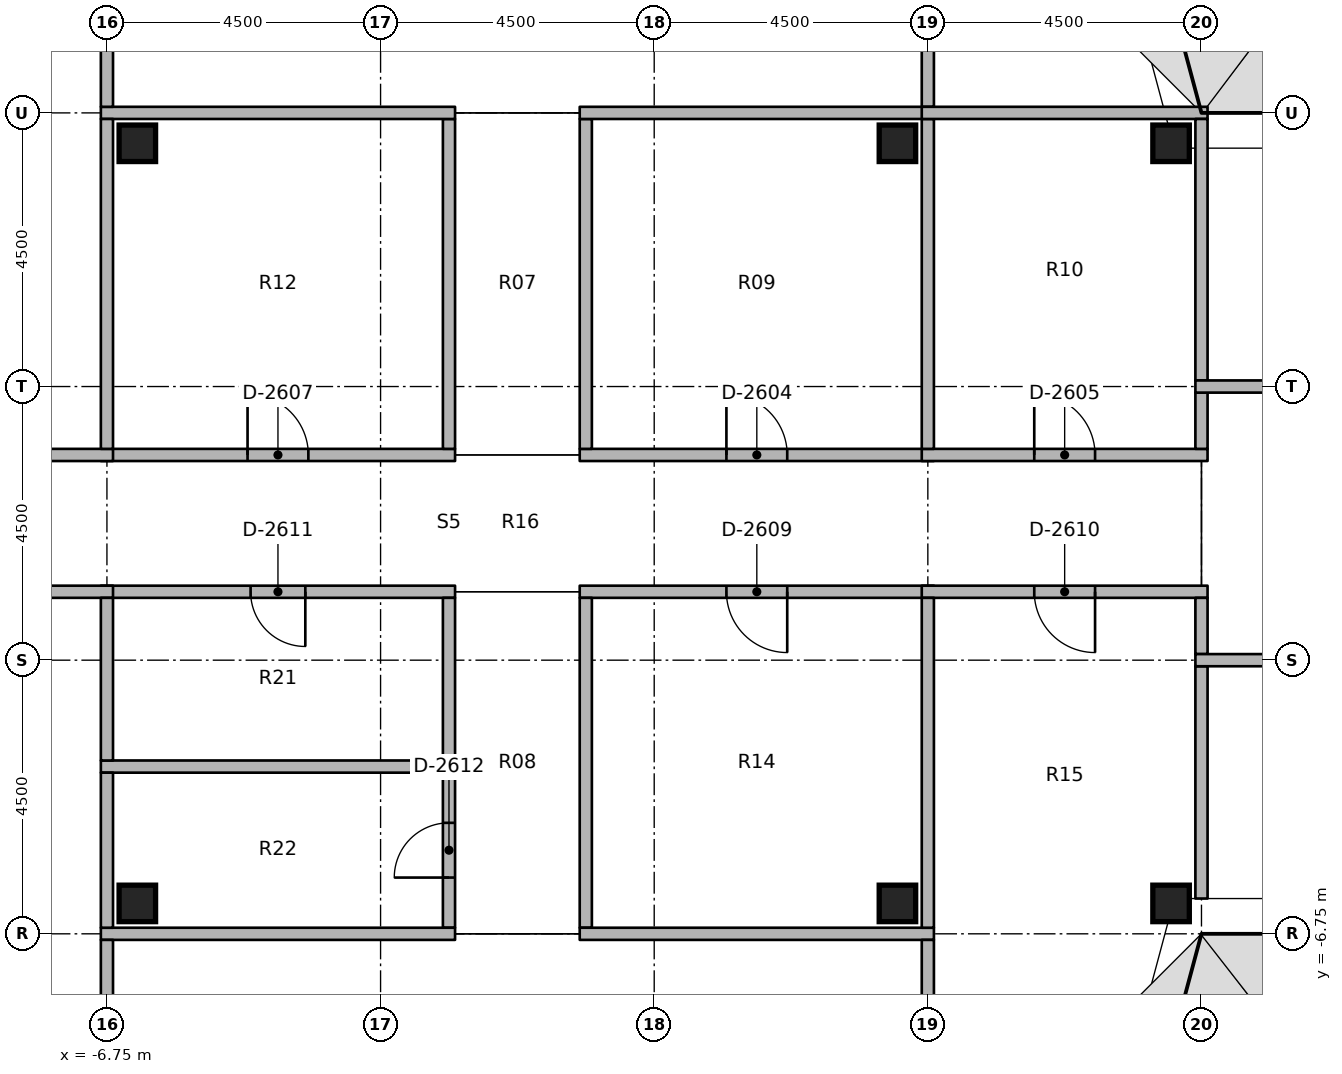
"""IFC4 building model, lengths in metres.
Left out: names, types, materials, properties, quantities, classifications, styles, units other than length and angle.
Written with IfcOpenShell. Run it as: python <this file> out.ifc"""

import sys

from ifc_helpers import new_model, si_unit, direction, frame, frame_2d, origin, origin_2d, place, context, subcontext, project, spatial, rectangle, extrude, element, fill, save


model = new_model("IFC4")
c1 = context("Model", 3, precision=1e-05, world=origin(), true_north=direction((0.0, 1.0)))
c2 = subcontext(c1, "Body", "Model", "MODEL_VIEW")
j1 = project(units=[si_unit("LENGTHUNIT", "METRE"), si_unit("PLANEANGLEUNIT", "RADIAN")], contexts=[c1])
p1 = place(None, origin())
s1 = spatial("IfcSite", under=j1, at=p1, CompositionType="ELEMENT")
p2 = place(p1, origin())
s2 = spatial("IfcBuilding", under=s1, at=p2, CompositionType="ELEMENT")
p3 = place(p2, frame((0.0, 0.0, 249.8)))
s3 = spatial("IfcBuildingStorey", under=s2, at=p3, CompositionType="ELEMENT", Elevation=249.8)
for number, where, z_axis, x_axis in (
    (1, (-6.25, -6.25, 0.0), (0.0, 0.0, 1.0), (1.0, 0.0, 0.0)),
    (2, (-6.25, 6.25, 0.0), (0.0, 0.0, 1.0), (1.0, 0.0, 0.0)),
    (3, (6.25, -6.25, 0.0), (0.0, 0.0, 1.0), (1.0, 0.0, 0.0)),
    (4, (6.25, 6.25, 0.0), (0.0, 0.0, 1.0), (1.0, 0.0, 0.0)),
    (5, (10.75, -6.25, 0.0), (0.0, 0.0, 1.0), (1.0, 0.0, 0.0)),
    (6, (10.75, 6.25, 0.0), (0.0, 0.0, 1.0), (1.0, 0.0, 0.0)),
):
    element("IfcColumn", number, at=place(p3, frame(where, z_axis=z_axis, x_axis=x_axis)), inside=s3, PredefinedType="COLUMN", context=c2, shape_type="SweptSolid", body=[
        extrude(rectangle(XDim=0.6, YDim=0.6, at=origin_2d()), origin(), (0.0, 0.0, 1.0), 3.65),
    ])
p4 = place(p3, frame((1.025, 1.125, 0.0), z_axis=(0.0, 0.0, 1.0), x_axis=(1.0, 0.0, 0.0)))
e7 = element("IfcWall", 7, at=p4, inside=s3, PredefinedType="PARTITIONING", context=c2, shape_type="SweptSolid", body=[
    extrude(rectangle(XDim=5.825, YDim=0.2, at=frame_2d((2.913, 0.0))), origin(), (0.0, 0.0, 1.0), 2.75),
])
p5 = place(p4, frame((2.413, 0.0, 0.0)))
e8 = element("IfcOpeningElement", 8, at=p5, cuts=e7, PredefinedType="OPENING", context=c2, shape_type="SweptSolid", body=[
    extrude(rectangle(XDim=1.0, YDim=2.1, at=frame_2d((0.5, 1.05))), frame((0.0, 0.11, 0.0), z_axis=(0.0, -1.0, 0.0), x_axis=(1.0, 0.0, 0.0)), (0.0, 0.0, 1.0), 0.22),
])
p6 = place(p3, frame((6.65, 1.125, 0.0), z_axis=(0.0, 0.0, 1.0), x_axis=(1.0, 0.0, 0.0)))
e9 = element("IfcWall", 9, at=p6, inside=s3, PredefinedType="PARTITIONING", context=c2, shape_type="SweptSolid", body=[
    extrude(rectangle(XDim=4.7, YDim=0.2, at=frame_2d((2.35, 0.0))), origin(), (0.0, 0.0, 1.0), 2.75),
])
p7 = place(p6, frame((1.85, 0.0, 0.0)))
e10 = element("IfcOpeningElement", 10, at=p7, cuts=e9, PredefinedType="OPENING", context=c2, shape_type="SweptSolid", body=[
    extrude(rectangle(XDim=1.0, YDim=2.1, at=frame_2d((0.5, 1.05))), frame((0.0, 0.11, 0.0), z_axis=(0.0, -1.0, 0.0), x_axis=(1.0, 0.0, 0.0)), (0.0, 0.0, 1.0), 0.22),
])
p8 = place(p3, frame((-6.85, 1.125, 0.0), z_axis=(0.0, 0.0, 1.0), x_axis=(1.0, 0.0, 0.0)))
e11 = element("IfcWall", 11, at=p8, inside=s3, PredefinedType="PARTITIONING", context=c2, shape_type="SweptSolid", body=[
    extrude(rectangle(XDim=5.825, YDim=0.2, at=frame_2d((2.913, 0.0))), origin(), (0.0, 0.0, 1.0), 2.75),
])
p9 = place(p8, frame((2.413, 0.0, 0.0)))
e12 = element("IfcOpeningElement", 12, at=p9, cuts=e11, PredefinedType="OPENING", context=c2, shape_type="SweptSolid", body=[
    extrude(rectangle(XDim=1.0, YDim=2.1, at=frame_2d((0.5, 1.05))), frame((0.0, 0.11, 0.0), z_axis=(0.0, -1.0, 0.0), x_axis=(1.0, 0.0, 0.0)), (0.0, 0.0, 1.0), 0.22),
])
p10 = place(p3, frame((-11.35, 1.125, 0.0), z_axis=(0.0, 0.0, 1.0), x_axis=(1.0, 0.0, 0.0)))
e13 = element("IfcWall", 13, at=p10, inside=s3, PredefinedType="PARTITIONING", context=c2, shape_type="SweptSolid", body=[
    extrude(rectangle(XDim=4.7, YDim=0.2, at=frame_2d((2.35, 0.0))), origin(), (0.0, 0.0, 1.0), 2.75),
])
p11 = place(p10, frame((1.85, 0.0, 0.0)))
e14 = element("IfcOpeningElement", 14, at=p11, cuts=e13, PredefinedType="OPENING", context=c2, shape_type="SweptSolid", body=[
    extrude(rectangle(XDim=1.0, YDim=2.1, at=frame_2d((0.5, 1.05))), frame((0.0, 0.11, 0.0), z_axis=(0.0, -1.0, 0.0), x_axis=(1.0, 0.0, 0.0)), (0.0, 0.0, 1.0), 0.22),
])
p12 = place(p3, frame((6.85, -1.125, 0.0), z_axis=(0.0, 0.0, 1.0), x_axis=(-1.0, 0.0, 0.0)))
e15 = element("IfcWall", 15, at=p12, inside=s3, PredefinedType="PARTITIONING", context=c2, shape_type="SweptSolid", body=[
    extrude(rectangle(XDim=5.825, YDim=0.2, at=frame_2d((2.913, 0.0))), origin(), (0.0, 0.0, 1.0), 2.75),
])
p13 = place(p12, frame((2.413, 0.0, 0.0)))
e16 = element("IfcOpeningElement", 16, at=p13, cuts=e15, PredefinedType="OPENING", context=c2, shape_type="SweptSolid", body=[
    extrude(rectangle(XDim=1.0, YDim=2.1, at=frame_2d((0.5, 1.05))), frame((0.0, 0.11, 0.0), z_axis=(0.0, -1.0, 0.0), x_axis=(1.0, 0.0, 0.0)), (0.0, 0.0, 1.0), 0.22),
])
p14 = place(p3, frame((11.35, -1.125, 0.0), z_axis=(0.0, 0.0, 1.0), x_axis=(-1.0, 0.0, 0.0)))
e17 = element("IfcWall", 17, at=p14, inside=s3, PredefinedType="PARTITIONING", context=c2, shape_type="SweptSolid", body=[
    extrude(rectangle(XDim=4.7, YDim=0.2, at=frame_2d((2.35, 0.0))), origin(), (0.0, 0.0, 1.0), 2.75),
])
p15 = place(p14, frame((1.85, 0.0, 0.0)))
e18 = element("IfcOpeningElement", 18, at=p15, cuts=e17, PredefinedType="OPENING", context=c2, shape_type="SweptSolid", body=[
    extrude(rectangle(XDim=1.0, YDim=2.1, at=frame_2d((0.5, 1.05))), frame((0.0, 0.11, 0.0), z_axis=(0.0, -1.0, 0.0), x_axis=(1.0, 0.0, 0.0)), (0.0, 0.0, 1.0), 0.22),
])
p16 = place(p3, frame((-1.025, -1.125, 0.0), z_axis=(0.0, 0.0, 1.0), x_axis=(-1.0, 0.0, 0.0)))
e19 = element("IfcWall", 19, at=p16, inside=s3, PredefinedType="PARTITIONING", context=c2, shape_type="SweptSolid", body=[
    extrude(rectangle(XDim=5.825, YDim=0.2, at=frame_2d((2.913, 0.0))), origin(), (0.0, 0.0, 1.0), 2.75),
])
p17 = place(p16, frame((2.462, 0.0, 0.0)))
e20 = element("IfcOpeningElement", 20, at=p17, cuts=e19, PredefinedType="OPENING", context=c2, shape_type="SweptSolid", body=[
    extrude(rectangle(XDim=0.9, YDim=2.1, at=frame_2d((0.45, 1.05))), frame((0.0, 0.11, 0.0), z_axis=(0.0, -1.0, 0.0), x_axis=(1.0, 0.0, 0.0)), (0.0, 0.0, 1.0), 0.22),
])
p18 = place(p3, frame((-6.65, -1.125, 0.0), z_axis=(0.0, 0.0, 1.0), x_axis=(-1.0, 0.0, 0.0)))
e21 = element("IfcWall", 21, at=p18, inside=s3, PredefinedType="PARTITIONING", context=c2, shape_type="SweptSolid", body=[
    extrude(rectangle(XDim=4.7, YDim=0.2, at=frame_2d((2.35, 0.0))), origin(), (0.0, 0.0, 1.0), 2.75),
])
p19 = place(p18, frame((1.85, 0.0, 0.0)))
e22 = element("IfcOpeningElement", 22, at=p19, cuts=e21, PredefinedType="OPENING", context=c2, shape_type="SweptSolid", body=[
    extrude(rectangle(XDim=1.0, YDim=2.1, at=frame_2d((0.5, 1.05))), frame((0.0, 0.11, 0.0), z_axis=(0.0, -1.0, 0.0), x_axis=(1.0, 0.0, 0.0)), (0.0, 0.0, 1.0), 0.22),
])
for number, where, z_axis, x_axis in (
    (23, (1.125, 1.225, 0.0), (0.0, 0.0, 1.0), (0.0, 1.0, 0.0)),
    (24, (-1.125, 1.225, 0.0), (0.0, 0.0, 1.0), (0.0, 1.0, 0.0)),
    (25, (1.125, -6.65, 0.0), (0.0, 0.0, 1.0), (0.0, 1.0, 0.0)),
):
    element("IfcWall", number, at=place(p3, frame(where, z_axis=z_axis, x_axis=x_axis)), inside=s3, PredefinedType="PARTITIONING", context=c2, shape_type="SweptSolid", body=[
        extrude(rectangle(XDim=5.425, YDim=0.2, at=frame_2d((2.712, 0.0))), origin(), (0.0, 0.0, 1.0), 2.75),
    ])
p20 = place(p3, frame((-1.125, -3.9, 0.0), z_axis=(0.0, 0.0, 1.0), x_axis=(0.0, 1.0, 0.0)))
e26 = element("IfcWall", 26, at=p20, inside=s3, PredefinedType="PARTITIONING", context=c2, shape_type="SweptSolid", body=[
    extrude(rectangle(XDim=2.675, YDim=0.2, at=frame_2d((1.337, 0.0))), origin(), (0.0, 0.0, 1.0), 2.75),
])
p21 = place(p3, frame((-1.125, -6.65, 0.0), z_axis=(0.0, 0.0, 1.0), x_axis=(0.0, 1.0, 0.0)))
e27 = element("IfcWall", 27, at=p21, inside=s3, PredefinedType="PARTITIONING", context=c2, shape_type="SweptSolid", body=[
    extrude(rectangle(XDim=2.55, YDim=0.2, at=frame_2d((1.275, 0.0))), origin(), (0.0, 0.0, 1.0), 2.75),
])
p22 = place(p21, frame((0.825, 0.0, 0.0)))
e28 = element("IfcOpeningElement", 28, at=p22, cuts=e27, PredefinedType="OPENING", context=c2, shape_type="SweptSolid", body=[
    extrude(rectangle(XDim=0.9, YDim=2.1, at=frame_2d((0.45, 1.05))), frame((0.0, 0.11, 0.0), z_axis=(0.0, -1.0, 0.0), x_axis=(1.0, 0.0, 0.0)), (0.0, 0.0, 1.0), 0.22),
])
p23 = place(p3, frame((1.025, 6.75, 0.0), z_axis=(0.0, 0.0, 1.0), x_axis=(1.0, 0.0, 0.0)))
e29 = element("IfcWall", 29, at=p23, inside=s3, PredefinedType="PARTITIONING", context=c2, shape_type="SweptSolid", body=[
    extrude(rectangle(XDim=5.825, YDim=0.2, at=frame_2d((2.913, 0.0))), origin(), (0.0, 0.0, 1.0), 2.75),
])
p24 = place(p3, frame((6.75, 10.63, 0.0), z_axis=(0.0, 0.0, 1.0), x_axis=(0.0, -1.0, 0.0)))
e30 = element("IfcWall", 30, at=p24, inside=s3, PredefinedType="PARTITIONING", context=c2, shape_type="SweptSolid", body=[
    extrude(rectangle(XDim=3.78, YDim=0.2, at=frame_2d((1.89, 0.0))), origin(), (0.0, 0.0, 1.0), 2.75),
])
p25 = place(p24, frame((1.44, 0.0, 0.0)))
e31 = element("IfcOpeningElement", 31, at=p25, cuts=e30, PredefinedType="OPENING", context=c2, shape_type="SweptSolid", body=[
    extrude(rectangle(XDim=0.9, YDim=2.1, at=frame_2d((0.45, 1.05))), frame((0.0, 0.11, 0.0), z_axis=(0.0, -1.0, 0.0), x_axis=(1.0, 0.0, 0.0)), (0.0, 0.0, 1.0), 0.22),
])
p26 = place(p3, frame((-6.85, 6.75, 0.0), z_axis=(0.0, 0.0, 1.0), x_axis=(1.0, 0.0, 0.0)))
e32 = element("IfcWall", 32, at=p26, inside=s3, PredefinedType="PARTITIONING", context=c2, shape_type="SweptSolid", body=[
    extrude(rectangle(XDim=5.825, YDim=0.2, at=frame_2d((2.913, 0.0))), origin(), (0.0, 0.0, 1.0), 2.75),
])
p27 = place(p3, frame((-6.75, 6.85, 0.0), z_axis=(0.0, 0.0, 1.0), x_axis=(0.0, 1.0, 0.0)))
e33 = element("IfcWall", 33, at=p27, inside=s3, PredefinedType="PARTITIONING", context=c2, shape_type="SweptSolid", body=[
    extrude(rectangle(XDim=3.78, YDim=0.2, at=frame_2d((1.89, 0.0))), origin(), (0.0, 0.0, 1.0), 2.75),
])
p28 = place(p3, frame((1.025, -6.75, 0.0), z_axis=(0.0, 0.0, 1.0), x_axis=(1.0, 0.0, 0.0)))
e34 = element("IfcWall", 34, at=p28, inside=s3, PredefinedType="PARTITIONING", context=c2, shape_type="SweptSolid", body=[
    extrude(rectangle(XDim=5.825, YDim=0.2, at=frame_2d((2.913, 0.0))), origin(), (0.0, 0.0, 1.0), 2.75),
])
p29 = place(p3, frame((6.75, -10.63, 0.0), z_axis=(0.0, 0.0, 1.0), x_axis=(0.0, 1.0, 0.0)))
e35 = element("IfcWall", 35, at=p29, inside=s3, PredefinedType="PARTITIONING", context=c2, shape_type="SweptSolid", body=[
    extrude(rectangle(XDim=3.78, YDim=0.2, at=frame_2d((1.89, 0.0))), origin(), (0.0, 0.0, 1.0), 2.75),
])
p30 = place(p3, frame((-6.85, -6.75, 0.0), z_axis=(0.0, 0.0, 1.0), x_axis=(1.0, 0.0, 0.0)))
e36 = element("IfcWall", 36, at=p30, inside=s3, PredefinedType="PARTITIONING", context=c2, shape_type="SweptSolid", body=[
    extrude(rectangle(XDim=5.825, YDim=0.2, at=frame_2d((2.913, 0.0))), origin(), (0.0, 0.0, 1.0), 2.75),
])
p31 = place(p3, frame((-6.75, -10.63, 0.0), z_axis=(0.0, 0.0, 1.0), x_axis=(0.0, 1.0, 0.0)))
e37 = element("IfcWall", 37, at=p31, inside=s3, PredefinedType="PARTITIONING", context=c2, shape_type="SweptSolid", body=[
    extrude(rectangle(XDim=3.78, YDim=0.2, at=frame_2d((1.89, 0.0))), origin(), (0.0, 0.0, 1.0), 2.75),
])
p32 = place(p3, frame((6.75, 1.225, 0.0), z_axis=(0.0, 0.0, 1.0), x_axis=(0.0, 1.0, 0.0)))
e38 = element("IfcWall", 38, at=p32, inside=s3, PredefinedType="PARTITIONING", context=c2, shape_type="SweptSolid", body=[
    extrude(rectangle(XDim=5.425, YDim=0.2, at=frame_2d((2.712, 0.0))), origin(), (0.0, 0.0, 1.0), 2.75),
])
p33 = place(p3, frame((6.65, 6.75, 0.0), z_axis=(0.0, 0.0, 1.0), x_axis=(1.0, 0.0, 0.0)))
e39 = element("IfcWall", 39, at=p33, inside=s3, PredefinedType="PARTITIONING", context=c2, shape_type="SweptSolid", body=[
    extrude(rectangle(XDim=4.7, YDim=0.2, at=frame_2d((2.35, 0.0))), origin(), (0.0, 0.0, 1.0), 2.75),
])
p34 = place(p3, frame((11.25, 1.225, 0.0), z_axis=(0.0, 0.0, 1.0), x_axis=(0.0, 1.0, 0.0)))
e40 = element("IfcWall", 40, at=p34, inside=s3, PredefinedType="PARTITIONING", context=c2, shape_type="SweptSolid", body=[
    extrude(rectangle(XDim=0.925, YDim=0.2, at=frame_2d((0.462, 0.0))), origin(), (0.0, 0.0, 1.0), 2.75),
])
p35 = place(p3, frame((11.25, 2.35, 0.0), z_axis=(0.0, 0.0, 1.0), x_axis=(0.0, 1.0, 0.0)))
e41 = element("IfcWall", 41, at=p35, inside=s3, PredefinedType="PARTITIONING", context=c2, shape_type="SweptSolid", body=[
    extrude(rectangle(XDim=4.3, YDim=0.2, at=frame_2d((2.15, 0.0))), origin(), (0.0, 0.0, 1.0), 2.75),
])
for number, where, z_axis, x_axis in (
    (42, (-6.75, 1.225, 0.0), (0.0, 0.0, 1.0), (0.0, 1.0, 0.0)),
    (43, (6.75, -6.65, 0.0), (0.0, 0.0, 1.0), (0.0, 1.0, 0.0)),
):
    element("IfcWall", number, at=place(p3, frame(where, z_axis=z_axis, x_axis=x_axis)), inside=s3, PredefinedType="PARTITIONING", context=c2, shape_type="SweptSolid", body=[
        extrude(rectangle(XDim=5.425, YDim=0.2, at=frame_2d((2.712, 0.0))), origin(), (0.0, 0.0, 1.0), 2.75),
    ])
p36 = place(p3, frame((11.25, -2.15, 0.0), z_axis=(0.0, 0.0, 1.0), x_axis=(0.0, 1.0, 0.0)))
e44 = element("IfcWall", 44, at=p36, inside=s3, PredefinedType="PARTITIONING", context=c2, shape_type="SweptSolid", body=[
    extrude(rectangle(XDim=0.925, YDim=0.2, at=frame_2d((0.462, 0.0))), origin(), (0.0, 0.0, 1.0), 2.75),
])
p37 = place(p3, frame((11.25, -6.17, 0.0), z_axis=(0.0, 0.0, 1.0), x_axis=(0.0, 1.0, 0.0)))
e45 = element("IfcWall", 45, at=p37, inside=s3, PredefinedType="PARTITIONING", context=c2, shape_type="SweptSolid", body=[
    extrude(rectangle(XDim=3.82, YDim=0.2, at=frame_2d((1.91, 0.0))), origin(), (0.0, 0.0, 1.0), 2.75),
])
p38 = place(p3, frame((-6.85, -4.0, 0.0), z_axis=(0.0, 0.0, 1.0), x_axis=(1.0, 0.0, 0.0)))
e46 = element("IfcWall", 46, at=p38, inside=s3, PredefinedType="PARTITIONING", context=c2, shape_type="SweptSolid", body=[
    extrude(rectangle(XDim=5.825, YDim=0.2, at=frame_2d((2.913, 0.0))), origin(), (0.0, 0.0, 1.0), 2.75),
])
p39 = place(p3, frame((-6.75, -3.9, 0.0), z_axis=(0.0, 0.0, 1.0), x_axis=(0.0, 1.0, 0.0)))
e47 = element("IfcWall", 47, at=p39, inside=s3, PredefinedType="PARTITIONING", context=c2, shape_type="SweptSolid", body=[
    extrude(rectangle(XDim=2.675, YDim=0.2, at=frame_2d((1.337, 0.0))), origin(), (0.0, 0.0, 1.0), 2.75),
])
p40 = place(p3, frame((-6.75, -6.65, 0.0), z_axis=(0.0, 0.0, 1.0), x_axis=(0.0, 1.0, 0.0)))
e48 = element("IfcWall", 48, at=p40, inside=s3, PredefinedType="PARTITIONING", context=c2, shape_type="SweptSolid", body=[
    extrude(rectangle(XDim=2.55, YDim=0.2, at=frame_2d((1.275, 0.0))), origin(), (0.0, 0.0, 1.0), 2.75),
])
p41 = place(p3, frame((11.15, 2.25, 0.0), z_axis=(0.0, 0.0, 1.0), x_axis=(1.0, 0.0, 0.0)))
e49 = element("IfcWall", 49, at=p41, inside=s3, PredefinedType="PARTITIONING", context=c2, shape_type="SweptSolid", body=[
    extrude(rectangle(XDim=4.7, YDim=0.2, at=frame_2d((2.35, 0.0))), origin(), (0.0, 0.0, 1.0), 2.75),
])
p42 = place(p41, frame((1.85, 0.0, 0.0)))
e50 = element("IfcOpeningElement", 50, at=p42, cuts=e49, PredefinedType="OPENING", context=c2, shape_type="SweptSolid", body=[
    extrude(rectangle(XDim=1.0, YDim=2.1, at=frame_2d((0.5, 1.05))), frame((0.0, 0.11, 0.0), z_axis=(0.0, -1.0, 0.0), x_axis=(1.0, 0.0, 0.0)), (0.0, 0.0, 1.0), 0.22),
])
p43 = place(p3, frame((15.85, -2.25, 0.0), z_axis=(0.0, 0.0, 1.0), x_axis=(-1.0, 0.0, 0.0)))
e51 = element("IfcWall", 51, at=p43, inside=s3, PredefinedType="PARTITIONING", context=c2, shape_type="SweptSolid", body=[
    extrude(rectangle(XDim=4.7, YDim=0.2, at=frame_2d((2.35, 0.0))), origin(), (0.0, 0.0, 1.0), 2.75),
])
p44 = place(p43, frame((1.85, 0.0, 0.0)))
e52 = element("IfcOpeningElement", 52, at=p44, cuts=e51, PredefinedType="OPENING", context=c2, shape_type="SweptSolid", body=[
    extrude(rectangle(XDim=1.0, YDim=2.1, at=frame_2d((0.5, 1.05))), frame((0.0, 0.11, 0.0), z_axis=(0.0, -1.0, 0.0), x_axis=(1.0, 0.0, 0.0)), (0.0, 0.0, 1.0), 0.22),
])
p45 = place(p5, origin())
e53 = element("IfcDoor", 53, at=p45, inside=s3, OperationType="SINGLE_SWING_RIGHT", PredefinedType="DOOR", context=c2, shape_type="SweptSolid", body=[
    extrude(rectangle(XDim=1.0, YDim=2.1, at=frame_2d((0.5, 1.05))), frame((0.0, 0.025, 0.0), z_axis=(0.0, -1.0, 0.0), x_axis=(1.0, 0.0, 0.0)), (0.0, 0.0, 1.0), 0.05),
])
fill(e8, e53)
p46 = place(p7, origin())
e54 = element("IfcDoor", 54, at=p46, inside=s3, OperationType="SINGLE_SWING_RIGHT", PredefinedType="DOOR", context=c2, shape_type="SweptSolid", body=[
    extrude(rectangle(XDim=1.0, YDim=2.1, at=frame_2d((0.5, 1.05))), frame((0.0, 0.025, 0.0), z_axis=(0.0, -1.0, 0.0), x_axis=(1.0, 0.0, 0.0)), (0.0, 0.0, 1.0), 0.05),
])
fill(e10, e54)
p47 = place(p9, origin())
e55 = element("IfcDoor", 55, at=p47, inside=s3, OperationType="SINGLE_SWING_RIGHT", PredefinedType="DOOR", context=c2, shape_type="SweptSolid", body=[
    extrude(rectangle(XDim=1.0, YDim=2.1, at=frame_2d((0.5, 1.05))), frame((0.0, 0.025, 0.0), z_axis=(0.0, -1.0, 0.0), x_axis=(1.0, 0.0, 0.0)), (0.0, 0.0, 1.0), 0.05),
])
fill(e12, e55)
p48 = place(p13, origin())
e56 = element("IfcDoor", 56, at=p48, inside=s3, OperationType="SINGLE_SWING_RIGHT", PredefinedType="DOOR", context=c2, shape_type="SweptSolid", body=[
    extrude(rectangle(XDim=1.0, YDim=2.1, at=frame_2d((0.5, 1.05))), frame((0.0, 0.025, 0.0), z_axis=(0.0, -1.0, 0.0), x_axis=(1.0, 0.0, 0.0)), (0.0, 0.0, 1.0), 0.05),
])
fill(e16, e56)
p49 = place(p15, origin())
e57 = element("IfcDoor", 57, at=p49, inside=s3, OperationType="SINGLE_SWING_RIGHT", PredefinedType="DOOR", context=c2, shape_type="SweptSolid", body=[
    extrude(rectangle(XDim=1.0, YDim=2.1, at=frame_2d((0.5, 1.05))), frame((0.0, 0.025, 0.0), z_axis=(0.0, -1.0, 0.0), x_axis=(1.0, 0.0, 0.0)), (0.0, 0.0, 1.0), 0.05),
])
fill(e18, e57)
p50 = place(p17, origin())
e58 = element("IfcDoor", 58, at=p50, inside=s3, OperationType="SINGLE_SWING_RIGHT", PredefinedType="DOOR", context=c2, shape_type="SweptSolid", body=[
    extrude(rectangle(XDim=0.9, YDim=2.1, at=frame_2d((0.45, 1.05))), frame((0.0, 0.025, 0.0), z_axis=(0.0, -1.0, 0.0), x_axis=(1.0, 0.0, 0.0)), (0.0, 0.0, 1.0), 0.05),
])
fill(e20, e58)
p51 = place(p22, origin())
e59 = element("IfcDoor", 59, at=p51, inside=s3, OperationType="SINGLE_SWING_RIGHT", PredefinedType="DOOR", context=c2, shape_type="SweptSolid", body=[
    extrude(rectangle(XDim=0.9, YDim=2.1, at=frame_2d((0.45, 1.05))), frame((0.0, 0.025, 0.0), z_axis=(0.0, -1.0, 0.0), x_axis=(1.0, 0.0, 0.0)), (0.0, 0.0, 1.0), 0.05),
])
fill(e28, e59)
save(model, sys.argv[1])
